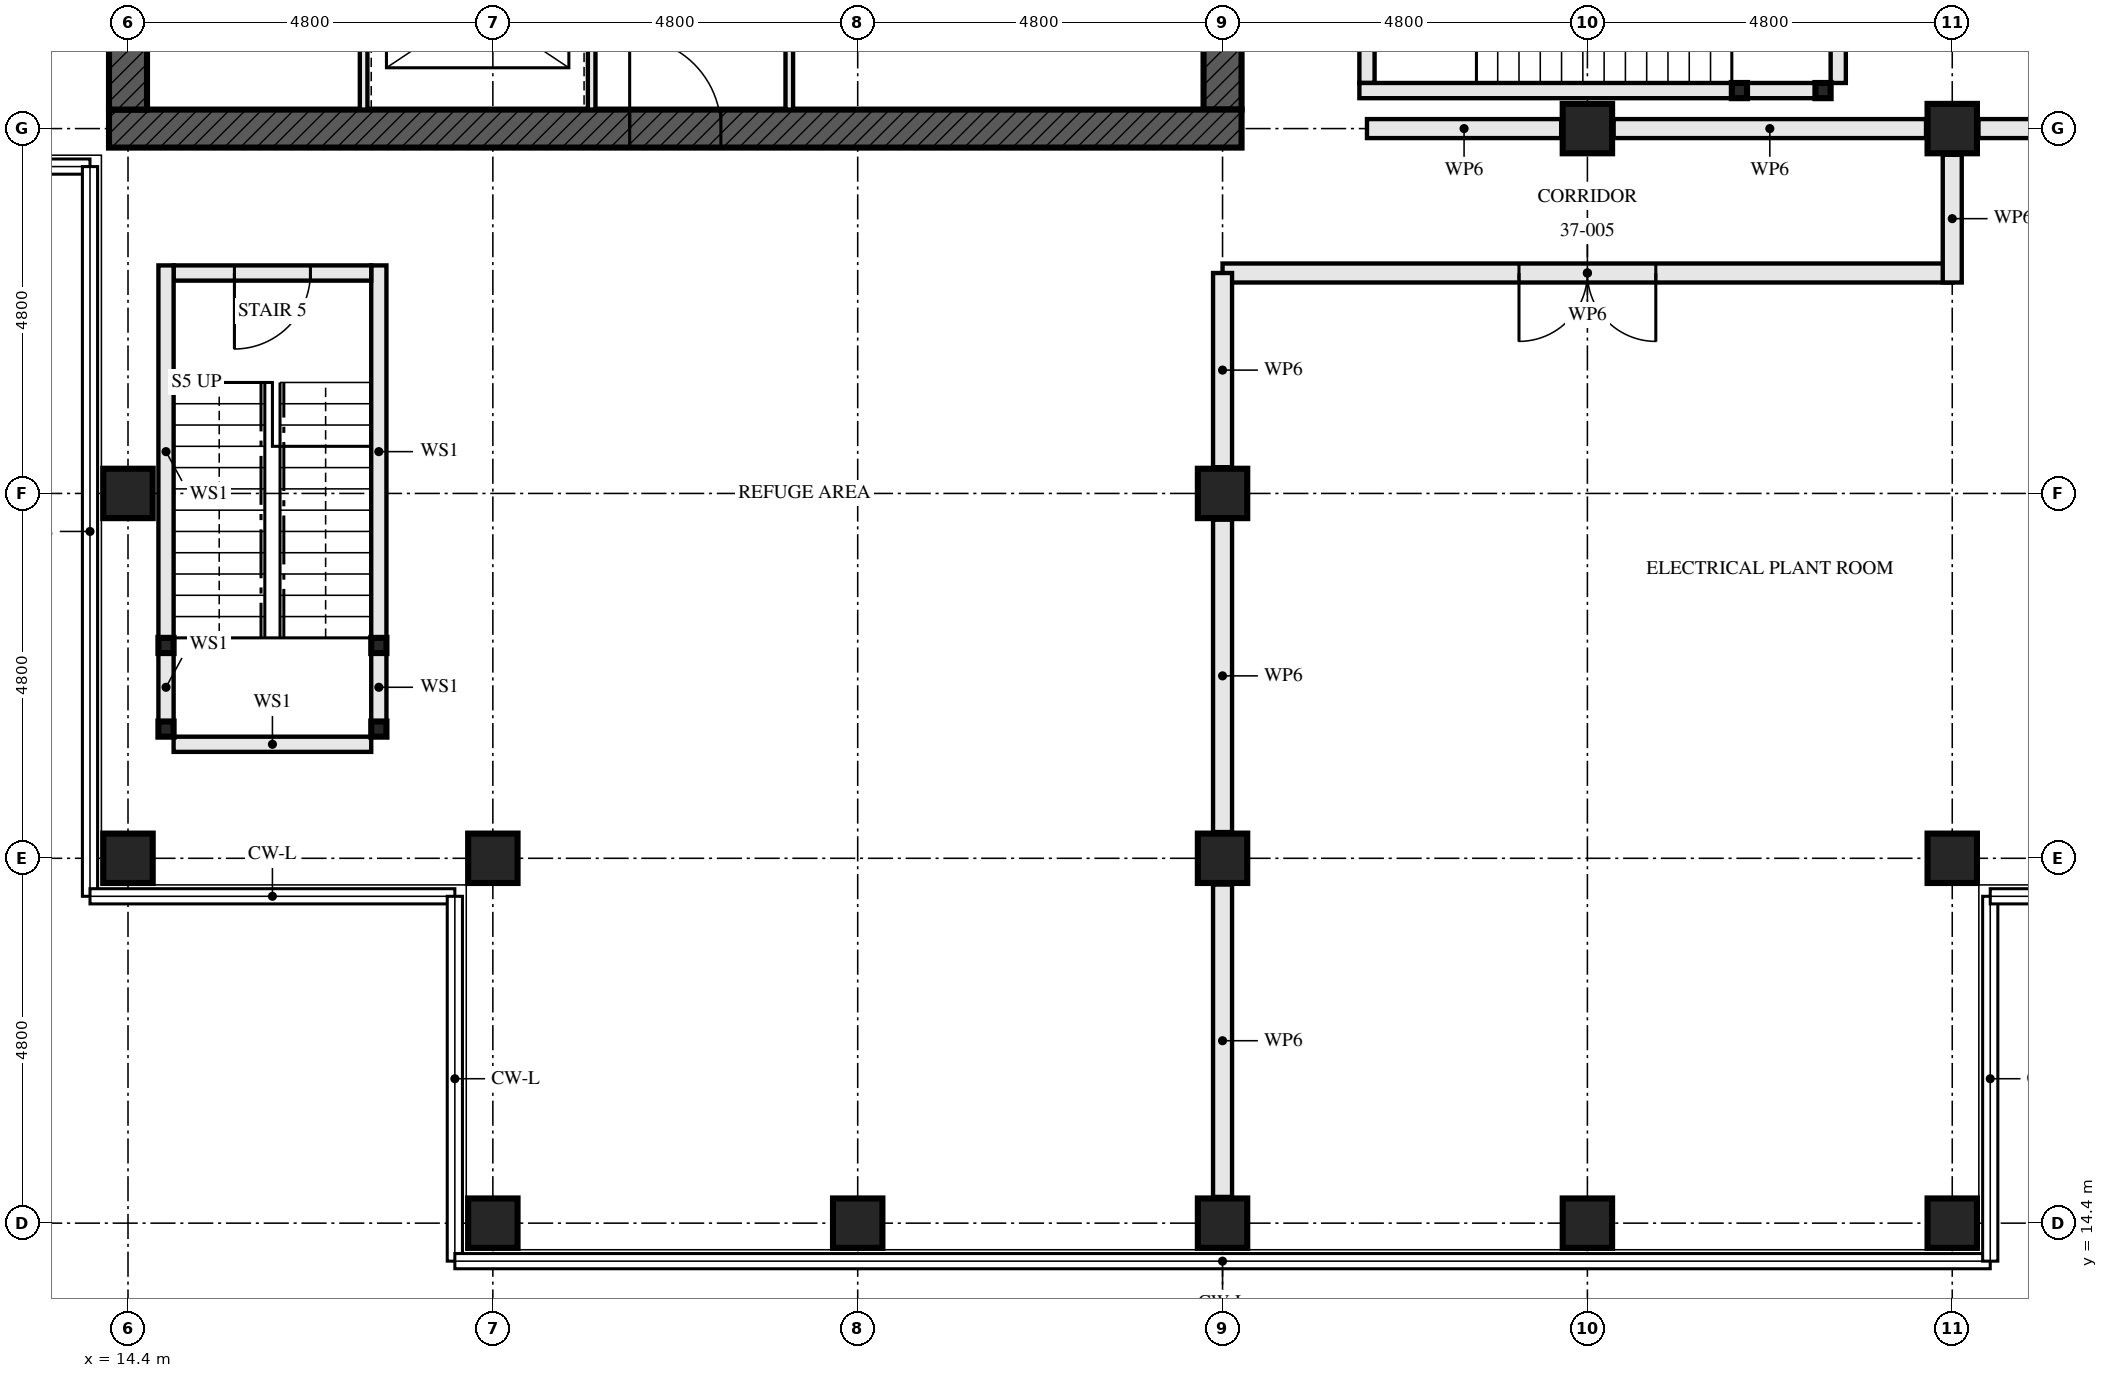
"""IFC4 building model, lengths in metres.
Left out: names, types, materials, properties, quantities, classifications, styles, units other than length and angle.
Written with IfcOpenShell. Run it as: python <this file> out.ifc"""

import sys

from ifc_helpers import new_model, si_unit, direction, frame, frame_2d, origin, origin_2d, place, context, subcontext, project, spatial, rectangle, hollow_rectangle, extrude, element, fill, save


model = new_model("IFC4")
c1 = context("Model", 3, precision=1e-05, world=origin(), true_north=direction((0.0, 1.0)))
c2 = subcontext(c1, "Body", "Model", "MODEL_VIEW")
j1 = project(units=[si_unit("LENGTHUNIT", "METRE"), si_unit("PLANEANGLEUNIT", "RADIAN")], contexts=[c1])
p1 = place(None, origin())
s1 = spatial("IfcSite", under=j1, at=p1, CompositionType="ELEMENT")
p2 = place(p1, origin())
s2 = spatial("IfcBuilding", under=s1, at=p2, CompositionType="ELEMENT")
p3 = place(p2, frame((0.0, 0.0, 136.5)))
s3 = spatial("IfcBuildingStorey", under=s2, at=p3, CompositionType="ELEMENT", Elevation=136.5)
for number, where, z_axis, x_axis in (
    (1, (14.4, 19.2, 0.0), (0.0, 0.0, 1.0), (0.0, 1.0, 0.0)),
    (2, (14.4, 24.0, 0.0), (0.0, 0.0, 1.0), (1.0, 0.0, 0.0)),
    (3, (19.2, 14.4, 0.0), (0.0, 0.0, 1.0), (0.0, 1.0, 0.0)),
    (4, (19.2, 19.2, 0.0), (0.0, 0.0, 1.0), (0.0, 1.0, 0.0)),
    (5, (24.0, 14.4, 0.0), (0.0, 0.0, 1.0), (0.0, 1.0, 0.0)),
):
    element("IfcColumn", number, at=place(p3, frame(where, z_axis=z_axis, x_axis=x_axis)), inside=s3, PredefinedType="COLUMN", context=c2, shape_type="SweptSolid", body=[
        extrude(hollow_rectangle(XDim=0.65, YDim=0.65, WallThickness=0.08, at=origin_2d()), origin(), (0.0, 0.0, 1.0), 4.5),
    ])
p4 = place(p3, frame((28.8, 14.4, 0.0), z_axis=(0.0, 0.0, 1.0), x_axis=(0.0, 1.0, 0.0)))
e6 = element("IfcColumn", 6, at=p4, inside=s3, PredefinedType="COLUMN", context=c2, shape_type="SweptSolid", body=[
    extrude(hollow_rectangle(XDim=0.65, YDim=0.65, WallThickness=0.08, at=origin_2d()), origin(), (0.0, 0.0, 1.0), 4.33),
])
for number, where, z_axis, x_axis in (
    (7, (28.8, 19.2, 0.0), (0.0, 0.0, 1.0), (1.0, 0.0, 0.0)),
    (8, (28.8, 24.0, 0.0), (0.0, 0.0, 1.0), (1.0, 0.0, 0.0)),
):
    element("IfcColumn", number, at=place(p3, frame(where, z_axis=z_axis, x_axis=x_axis)), inside=s3, PredefinedType="COLUMN", context=c2, shape_type="SweptSolid", body=[
        extrude(hollow_rectangle(XDim=0.65, YDim=0.65, WallThickness=0.05, at=origin_2d()), origin(), (0.0, 0.0, 1.0), 4.5),
    ])
p5 = place(p3, frame((33.6, 14.4, 0.0), z_axis=(0.0, 0.0, 1.0), x_axis=(0.0, 1.0, 0.0)))
e9 = element("IfcColumn", 9, at=p5, inside=s3, PredefinedType="COLUMN", context=c2, shape_type="SweptSolid", body=[
    extrude(hollow_rectangle(XDim=0.65, YDim=0.65, WallThickness=0.08, at=origin_2d()), origin(), (0.0, 0.0, 1.0), 4.33),
])
p6 = place(p3, frame((33.6, 28.8, 0.0), z_axis=(0.0, 0.0, 1.0), x_axis=(0.0, 1.0, 0.0)))
e10 = element("IfcColumn", 10, at=p6, inside=s3, PredefinedType="COLUMN", context=c2, shape_type="SweptSolid", body=[
    extrude(hollow_rectangle(XDim=0.65, YDim=0.65, WallThickness=0.05, at=origin_2d()), origin(), (0.0, 0.0, 1.0), 4.5),
])
for number, where, z_axis, x_axis in (
    (11, (38.4, 14.4, 0.0), (0.0, 0.0, 1.0), (0.0, 1.0, 0.0)),
    (12, (38.4, 19.2, 0.0), (0.0, 0.0, 1.0), (0.0, 1.0, 0.0)),
):
    element("IfcColumn", number, at=place(p3, frame(where, z_axis=z_axis, x_axis=x_axis)), inside=s3, PredefinedType="COLUMN", context=c2, shape_type="SweptSolid", body=[
        extrude(hollow_rectangle(XDim=0.65, YDim=0.65, WallThickness=0.08, at=origin_2d()), origin(), (0.0, 0.0, 1.0), 4.33),
    ])
p7 = place(p3, frame((38.4, 28.8, 0.0), z_axis=(0.0, 0.0, 1.0), x_axis=(0.0, 1.0, 0.0)))
e13 = element("IfcColumn", 13, at=p7, inside=s3, PredefinedType="COLUMN", context=c2, shape_type="SweptSolid", body=[
    extrude(hollow_rectangle(XDim=0.65, YDim=0.65, WallThickness=0.05, at=origin_2d()), origin(), (0.0, 0.0, 1.0), 4.5),
])
p8 = place(p3, frame((14.15, 28.8, -0.25), z_axis=(0.0, 0.0, 1.0), x_axis=(1.0, 0.0, 0.0)))
e14 = element("IfcWall", 14, at=p8, inside=s3, PredefinedType="SHEAR", context=c2, shape_type="SweptSolid", body=[
    extrude(rectangle(XDim=14.9, YDim=0.5, at=frame_2d((7.45, 0.0))), origin(), (0.0, 0.0, 1.0), 4.58),
])
p9 = place(p8, frame((6.85, 0.0, 0.25)))
e15 = element("IfcOpeningElement", 15, at=p9, cuts=e14, PredefinedType="OPENING", context=c2, shape_type="SweptSolid", body=[
    extrude(rectangle(XDim=1.2, YDim=2.1, at=frame_2d((0.6, 1.05))), frame((0.0, 0.26, 0.0), z_axis=(0.0, -1.0, 0.0), x_axis=(1.0, 0.0, 0.0)), (0.0, 0.0, 1.0), 0.521),
])
p10 = place(p3, frame((14.4, 42.95, -0.25), z_axis=(0.0, 0.0, 1.0), x_axis=(0.0, -1.0, 0.0)))
e16 = element("IfcWall", 16, at=p10, inside=s3, PredefinedType="SHEAR", context=c2, shape_type="SweptSolid", body=[
    extrude(rectangle(XDim=13.9, YDim=0.5, at=frame_2d((6.95, 0.0))), origin(), (0.0, 0.0, 1.0), 4.58),
])
p11 = place(p10, frame((6.35, 0.0, 0.25)))
e17 = element("IfcOpeningElement", 17, at=p11, cuts=e16, PredefinedType="OPENING", context=c2, shape_type="SweptSolid", body=[
    extrude(rectangle(XDim=1.2, YDim=2.1, at=frame_2d((0.6, 1.05))), frame((0.0, 0.26, 0.0), z_axis=(0.0, -1.0, 0.0), x_axis=(1.0, 0.0, 0.0)), (0.0, 0.0, 1.0), 0.521),
])
p12 = place(p3, frame((28.8, 29.05, -0.25), z_axis=(0.0, 0.0, 1.0), x_axis=(0.0, 1.0, 0.0)))
e18 = element("IfcWall", 18, at=p12, inside=s3, PredefinedType="SHEAR", context=c2, shape_type="SweptSolid", body=[
    extrude(rectangle(XDim=13.9, YDim=0.5, at=frame_2d((6.95, 0.0))), origin(), (0.0, 0.0, 1.0), 4.58),
])
p13 = place(p12, frame((6.35, 0.0, 0.25)))
e19 = element("IfcOpeningElement", 19, at=p13, cuts=e18, PredefinedType="OPENING", context=c2, shape_type="SweptSolid", body=[
    extrude(rectangle(XDim=1.2, YDim=2.1, at=frame_2d((0.6, 1.05))), frame((0.0, 0.26, 0.0), z_axis=(0.0, -1.0, 0.0), x_axis=(1.0, 0.0, 0.0)), (0.0, 0.0, 1.0), 0.521),
])
for number, where, z_axis, x_axis in (
    (20, (36.7, 29.3, 0.0), (0.0, 0.0, 1.0), (1.0, 0.0, 0.0)),
    (21, (35.6, 29.3, 0.0), (0.0, 0.0, 1.0), (1.0, 0.0, 0.0)),
    (22, (14.9, 20.9, 0.0), (0.0, 0.0, 1.0), (1.0, 0.0, 0.0)),
    (23, (17.7, 20.9, 0.0), (0.0, 0.0, 1.0), (1.0, 0.0, 0.0)),
    (24, (14.9, 22.0, 0.0), (0.0, 0.0, 1.0), (1.0, 0.0, 0.0)),
    (25, (17.7, 22.0, 0.0), (0.0, 0.0, 1.0), (1.0, 0.0, 0.0)),
):
    element("IfcColumn", number, at=place(p3, frame(where, z_axis=z_axis, x_axis=x_axis)), inside=s3, PredefinedType="COLUMN", context=c2, shape_type="SweptSolid", body=[
        extrude(hollow_rectangle(XDim=0.2, YDim=0.2, WallThickness=0.008, at=origin_2d()), origin(), (0.0, 0.0, 1.0), 4.33),
    ])
p14 = place(p3, frame((14.9, 21.0, 0.0), z_axis=(0.0, 0.0, 1.0), x_axis=(0.0, 1.0, 0.0)))
e26 = element("IfcWall", 26, at=p14, inside=s3, PredefinedType="SOLIDWALL", context=c2, shape_type="SweptSolid", body=[
    extrude(rectangle(XDim=0.9, YDim=0.2, at=frame_2d((0.45, 0.0))), origin(), (0.0, 0.0, 1.0), 3.99),
])
p15 = place(p3, frame((14.9, 22.1, 0.0), z_axis=(0.0, 0.0, 1.0), x_axis=(0.0, 1.0, 0.0)))
e27 = element("IfcWall", 27, at=p15, inside=s3, PredefinedType="SOLIDWALL", context=c2, shape_type="SweptSolid", body=[
    extrude(rectangle(XDim=4.9, YDim=0.2, at=frame_2d((2.45, 0.0))), origin(), (0.0, 0.0, 1.0), 3.99),
])
p16 = place(p3, frame((17.7, 21.0, 0.0), z_axis=(0.0, 0.0, 1.0), x_axis=(0.0, 1.0, 0.0)))
e28 = element("IfcWall", 28, at=p16, inside=s3, PredefinedType="SOLIDWALL", context=c2, shape_type="SweptSolid", body=[
    extrude(rectangle(XDim=0.9, YDim=0.2, at=frame_2d((0.45, 0.0))), origin(), (0.0, 0.0, 1.0), 3.99),
])
p17 = place(p3, frame((17.7, 22.1, 0.0), z_axis=(0.0, 0.0, 1.0), x_axis=(0.0, 1.0, 0.0)))
e29 = element("IfcWall", 29, at=p17, inside=s3, PredefinedType="SOLIDWALL", context=c2, shape_type="SweptSolid", body=[
    extrude(rectangle(XDim=4.9, YDim=0.2, at=frame_2d((2.45, 0.0))), origin(), (0.0, 0.0, 1.0), 3.99),
])
p18 = place(p3, frame((15.0, 20.7, 0.0), z_axis=(0.0, 0.0, 1.0), x_axis=(1.0, 0.0, 0.0)))
e30 = element("IfcWall", 30, at=p18, inside=s3, PredefinedType="SOLIDWALL", context=c2, shape_type="SweptSolid", body=[
    extrude(rectangle(XDim=2.6, YDim=0.2, at=frame_2d((1.3, 0.0))), origin(), (0.0, 0.0, 1.0), 4.33),
])
p19 = place(p3, frame((15.0, 26.9, 0.0), z_axis=(0.0, 0.0, 1.0), x_axis=(1.0, 0.0, 0.0)))
e31 = element("IfcWall", 31, at=p19, inside=s3, PredefinedType="SOLIDWALL", context=c2, shape_type="SweptSolid", body=[
    extrude(rectangle(XDim=2.6, YDim=0.2, at=frame_2d((1.3, 0.0))), origin(), (0.0, 0.0, 1.0), 4.33),
])
p20 = place(p19, frame((0.8, 0.0, 0.0)))
e32 = element("IfcOpeningElement", 32, at=p20, cuts=e31, PredefinedType="OPENING", context=c2, shape_type="SweptSolid", body=[
    extrude(rectangle(XDim=1.0, YDim=2.1, at=frame_2d((0.5, 1.05))), frame((0.0, 0.111, 0.0), z_axis=(0.0, -1.0, 0.0), x_axis=(1.0, 0.0, 0.0)), (0.0, 0.0, 1.0), 0.221),
])
p21 = place(p3, frame((28.8, 26.9, 0.0), z_axis=(0.0, 0.0, 1.0), x_axis=(1.0, 0.0, 0.0)))
e33 = element("IfcWall", 33, at=p21, inside=s3, PredefinedType="SOLIDWALL", context=c2, shape_type="SweptSolid", body=[
    extrude(rectangle(XDim=9.6, YDim=0.25, at=frame_2d((4.8, 0.0))), origin(), (0.0, 0.0, 1.0), 4.33),
])
p22 = place(p21, frame((3.9, 0.0, 0.0)))
e34 = element("IfcOpeningElement", 34, at=p22, cuts=e33, PredefinedType="OPENING", context=c2, shape_type="SweptSolid", body=[
    extrude(rectangle(XDim=1.8, YDim=2.4, at=frame_2d((0.9, 1.2))), frame((0.0, 0.135, 0.0), z_axis=(0.0, -1.0, 0.0), x_axis=(1.0, 0.0, 0.0)), (0.0, 0.0, 1.0), 0.271),
])
p23 = place(p3, frame((38.4, 26.775, 0.0), z_axis=(0.0, 0.0, 1.0), x_axis=(0.0, 1.0, 0.0)))
e35 = element("IfcWall", 35, at=p23, inside=s3, PredefinedType="SOLIDWALL", context=c2, shape_type="SweptSolid", body=[
    extrude(rectangle(XDim=1.68, YDim=0.25, at=frame_2d((0.84, 0.0))), origin(), (0.0, 0.0, 1.0), 4.33),
])
p24 = place(p3, frame((36.6, 29.3, 0.0), z_axis=(0.0, 0.0, 1.0), x_axis=(-1.0, 0.0, 0.0)))
e36 = element("IfcWall", 36, at=p24, inside=s3, PredefinedType="SOLIDWALL", context=c2, shape_type="SweptSolid", body=[
    extrude(rectangle(XDim=0.9, YDim=0.2, at=frame_2d((0.45, 0.0))), origin(), (0.0, 0.0, 1.0), 3.99),
])
p25 = place(p3, frame((35.5, 29.3, 0.0), z_axis=(0.0, 0.0, 1.0), x_axis=(-1.0, 0.0, 0.0)))
e37 = element("IfcWall", 37, at=p25, inside=s3, PredefinedType="SOLIDWALL", context=c2, shape_type="SweptSolid", body=[
    extrude(rectangle(XDim=4.9, YDim=0.2, at=frame_2d((2.45, 0.0))), origin(), (0.0, 0.0, 1.0), 3.99),
])
p26 = place(p3, frame((36.9, 29.4, 0.0), z_axis=(0.0, 0.0, 1.0), x_axis=(0.0, 1.0, 0.0)))
e38 = element("IfcWall", 38, at=p26, inside=s3, PredefinedType="SOLIDWALL", context=c2, shape_type="SweptSolid", body=[
    extrude(rectangle(XDim=2.6, YDim=0.2, at=frame_2d((1.3, 0.0))), origin(), (0.0, 0.0, 1.0), 4.33),
])
p27 = place(p3, frame((30.7, 29.4, 0.0), z_axis=(0.0, 0.0, 1.0), x_axis=(0.0, 1.0, 0.0)))
e39 = element("IfcWall", 39, at=p27, inside=s3, PredefinedType="SOLIDWALL", context=c2, shape_type="SweptSolid", body=[
    extrude(rectangle(XDim=2.6, YDim=0.2, at=frame_2d((1.3, 0.0))), origin(), (0.0, 0.0, 1.0), 4.33),
])
p28 = place(p27, frame((0.8, 0.0, 0.0)))
e40 = element("IfcOpeningElement", 40, at=p28, cuts=e39, PredefinedType="OPENING", context=c2, shape_type="SweptSolid", body=[
    extrude(rectangle(XDim=1.0, YDim=2.1, at=frame_2d((0.5, 1.05))), frame((0.0, 0.111, 0.0), z_axis=(0.0, -1.0, 0.0), x_axis=(1.0, 0.0, 0.0)), (0.0, 0.0, 1.0), 0.221),
])
p29 = place(p3, frame((20.5, 29.05, 0.0), z_axis=(0.0, 0.0, 1.0), x_axis=(0.0, 1.0, 0.0)))
e41 = element("IfcWall", 41, at=p29, inside=s3, PredefinedType="SOLIDWALL", context=c2, shape_type="SweptSolid", body=[
    extrude(rectangle(XDim=5.8, YDim=0.1, at=frame_2d((2.9, 0.0))), origin(), (0.0, 0.0, 1.0), 4.33),
])
p30 = place(p29, frame((0.8, 0.0, 0.0)))
e42 = element("IfcOpeningElement", 42, at=p30, cuts=e41, PredefinedType="OPENING", context=c2, shape_type="SweptSolid", body=[
    extrude(rectangle(XDim=1.1, YDim=2.3, at=frame_2d((0.55, 1.15))), frame((0.0, 0.061, 0.0), z_axis=(0.0, -1.0, 0.0), x_axis=(1.0, 0.0, 0.0)), (0.0, 0.0, 1.0), 0.121),
])
p31 = place(p29, frame((3.775, 0.0, 0.0)))
e43 = element("IfcOpeningElement", 43, at=p31, cuts=e41, PredefinedType="OPENING", context=c2, shape_type="SweptSolid", body=[
    extrude(rectangle(XDim=1.1, YDim=2.3, at=frame_2d((0.55, 1.15))), frame((0.0, 0.061, 0.0), z_axis=(0.0, -1.0, 0.0), x_axis=(1.0, 0.0, 0.0)), (0.0, 0.0, 1.0), 0.121),
])
p32 = place(p3, frame((23.1, 29.05, 0.0), z_axis=(0.0, 0.0, 1.0), x_axis=(0.0, 1.0, 0.0)))
e44 = element("IfcWall", 44, at=p32, inside=s3, PredefinedType="SOLIDWALL", context=c2, shape_type="SweptSolid", body=[
    extrude(rectangle(XDim=5.8, YDim=0.1, at=frame_2d((2.9, 0.0))), origin(), (0.0, 0.0, 1.0), 4.33),
])
p33 = place(p32, frame((1.0, 0.0, 0.0)))
e45 = element("IfcOpeningElement", 45, at=p33, cuts=e44, PredefinedType="OPENING", context=c2, shape_type="SweptSolid", body=[
    extrude(rectangle(XDim=0.7, YDim=2.1, at=frame_2d((0.35, 1.05))), frame((0.0, 0.061, 0.0), z_axis=(0.0, -1.0, 0.0), x_axis=(1.0, 0.0, 0.0)), (0.0, 0.0, 1.0), 0.121),
])
p34 = place(p3, frame((17.5, 29.05, 0.0), z_axis=(0.0, 0.0, 1.0), x_axis=(0.0, 1.0, 0.0)))
e46 = element("IfcWall", 46, at=p34, inside=s3, PredefinedType="SOLIDWALL", context=c2, shape_type="SweptSolid", body=[
    extrude(rectangle(XDim=5.8, YDim=0.1, at=frame_2d((2.9, 0.0))), origin(), (0.0, 0.0, 1.0), 4.33),
])
p35 = place(p3, frame((28.8, 14.745, 0.0), z_axis=(0.0, 0.0, 1.0), x_axis=(0.0, 1.0, 0.0)))
e47 = element("IfcWall", 47, at=p35, inside=s3, PredefinedType="SOLIDWALL", context=c2, shape_type="SweptSolid", body=[
    extrude(rectangle(XDim=4.11, YDim=0.25, at=frame_2d((2.055, 0.0))), origin(), (0.0, 0.0, 1.0), 2.82),
])
p36 = place(p3, frame((28.8, 19.545, 0.0), z_axis=(0.0, 0.0, 1.0), x_axis=(0.0, 1.0, 0.0)))
e48 = element("IfcWall", 48, at=p36, inside=s3, PredefinedType="SOLIDWALL", context=c2, shape_type="SweptSolid", body=[
    extrude(rectangle(XDim=4.11, YDim=0.25, at=frame_2d((2.055, 0.0))), origin(), (0.0, 0.0, 1.0), 2.82),
])
p37 = place(p3, frame((28.8, 24.345, 0.0), z_axis=(0.0, 0.0, 1.0), x_axis=(0.0, 1.0, 0.0)))
e49 = element("IfcWall", 49, at=p37, inside=s3, PredefinedType="SOLIDWALL", context=c2, shape_type="SweptSolid", body=[
    extrude(rectangle(XDim=2.555, YDim=0.25, at=frame_2d((1.277, 0.0))), origin(), (0.0, 0.0, 1.0), 2.82),
])
for number, where, z_axis, x_axis in (
    (50, (42.855, 28.8, 0.0), (0.0, 0.0, 1.0), (-1.0, 0.0, 0.0)),
    (51, (38.055, 28.8, 0.0), (0.0, 0.0, 1.0), (-1.0, 0.0, 0.0)),
):
    element("IfcWall", number, at=place(p3, frame(where, z_axis=z_axis, x_axis=x_axis)), inside=s3, PredefinedType="SOLIDWALL", context=c2, shape_type="SweptSolid", body=[
        extrude(rectangle(XDim=4.11, YDim=0.25, at=frame_2d((2.055, 0.0))), origin(), (0.0, 0.0, 1.0), 3.12),
    ])
p38 = place(p3, frame((33.255, 28.8, 0.0), z_axis=(0.0, 0.0, 1.0), x_axis=(-1.0, 0.0, 0.0)))
e52 = element("IfcWall", 52, at=p38, inside=s3, PredefinedType="SOLIDWALL", context=c2, shape_type="SweptSolid", body=[
    extrude(rectangle(XDim=2.555, YDim=0.25, at=frame_2d((1.277, 0.0))), origin(), (0.0, 0.0, 1.0), 3.12),
])
p39 = place(p20, frame((1.0, 0.0, 0.0), z_axis=(0.0, 0.0, 1.0), x_axis=(-1.0, 0.0, 0.0)))
e53 = element("IfcDoor", 53, at=p39, inside=s3, OperationType="SINGLE_SWING_LEFT", PredefinedType="DOOR", context=c2, shape_type="SweptSolid", body=[
    extrude(rectangle(XDim=1.0, YDim=2.1, at=frame_2d((0.5, 1.05))), frame((0.0, 0.032, 0.0), z_axis=(0.0, -1.0, 0.0), x_axis=(1.0, 0.0, 0.0)), (0.0, 0.0, 1.0), 0.064),
])
fill(e32, e53)
p40 = place(p22, frame((1.8, 0.0, 0.0), z_axis=(0.0, 0.0, 1.0), x_axis=(-1.0, 0.0, 0.0)))
e54 = element("IfcDoor", 54, at=p40, inside=s3, OperationType="DOUBLE_DOOR_SINGLE_SWING", PredefinedType="DOOR", context=c2, shape_type="SweptSolid", body=[
    extrude(rectangle(XDim=1.8, YDim=2.4, at=frame_2d((0.9, 1.2))), frame((0.0, 0.032, 0.0), z_axis=(0.0, -1.0, 0.0), x_axis=(1.0, 0.0, 0.0)), (0.0, 0.0, 1.0), 0.064),
])
fill(e34, e54)
p41 = place(p9, origin())
e55 = element("IfcDoor", 55, at=p41, inside=s3, OperationType="SINGLE_SWING_LEFT", PredefinedType="DOOR", context=c2, shape_type="SweptSolid", body=[
    extrude(rectangle(XDim=1.2, YDim=2.1, at=frame_2d((0.6, 1.05))), frame((0.0, 0.027, 0.0), z_axis=(0.0, -1.0, 0.0), x_axis=(1.0, 0.0, 0.0)), (0.0, 0.0, 1.0), 0.054),
])
fill(e15, e55)
save(model, sys.argv[1])
